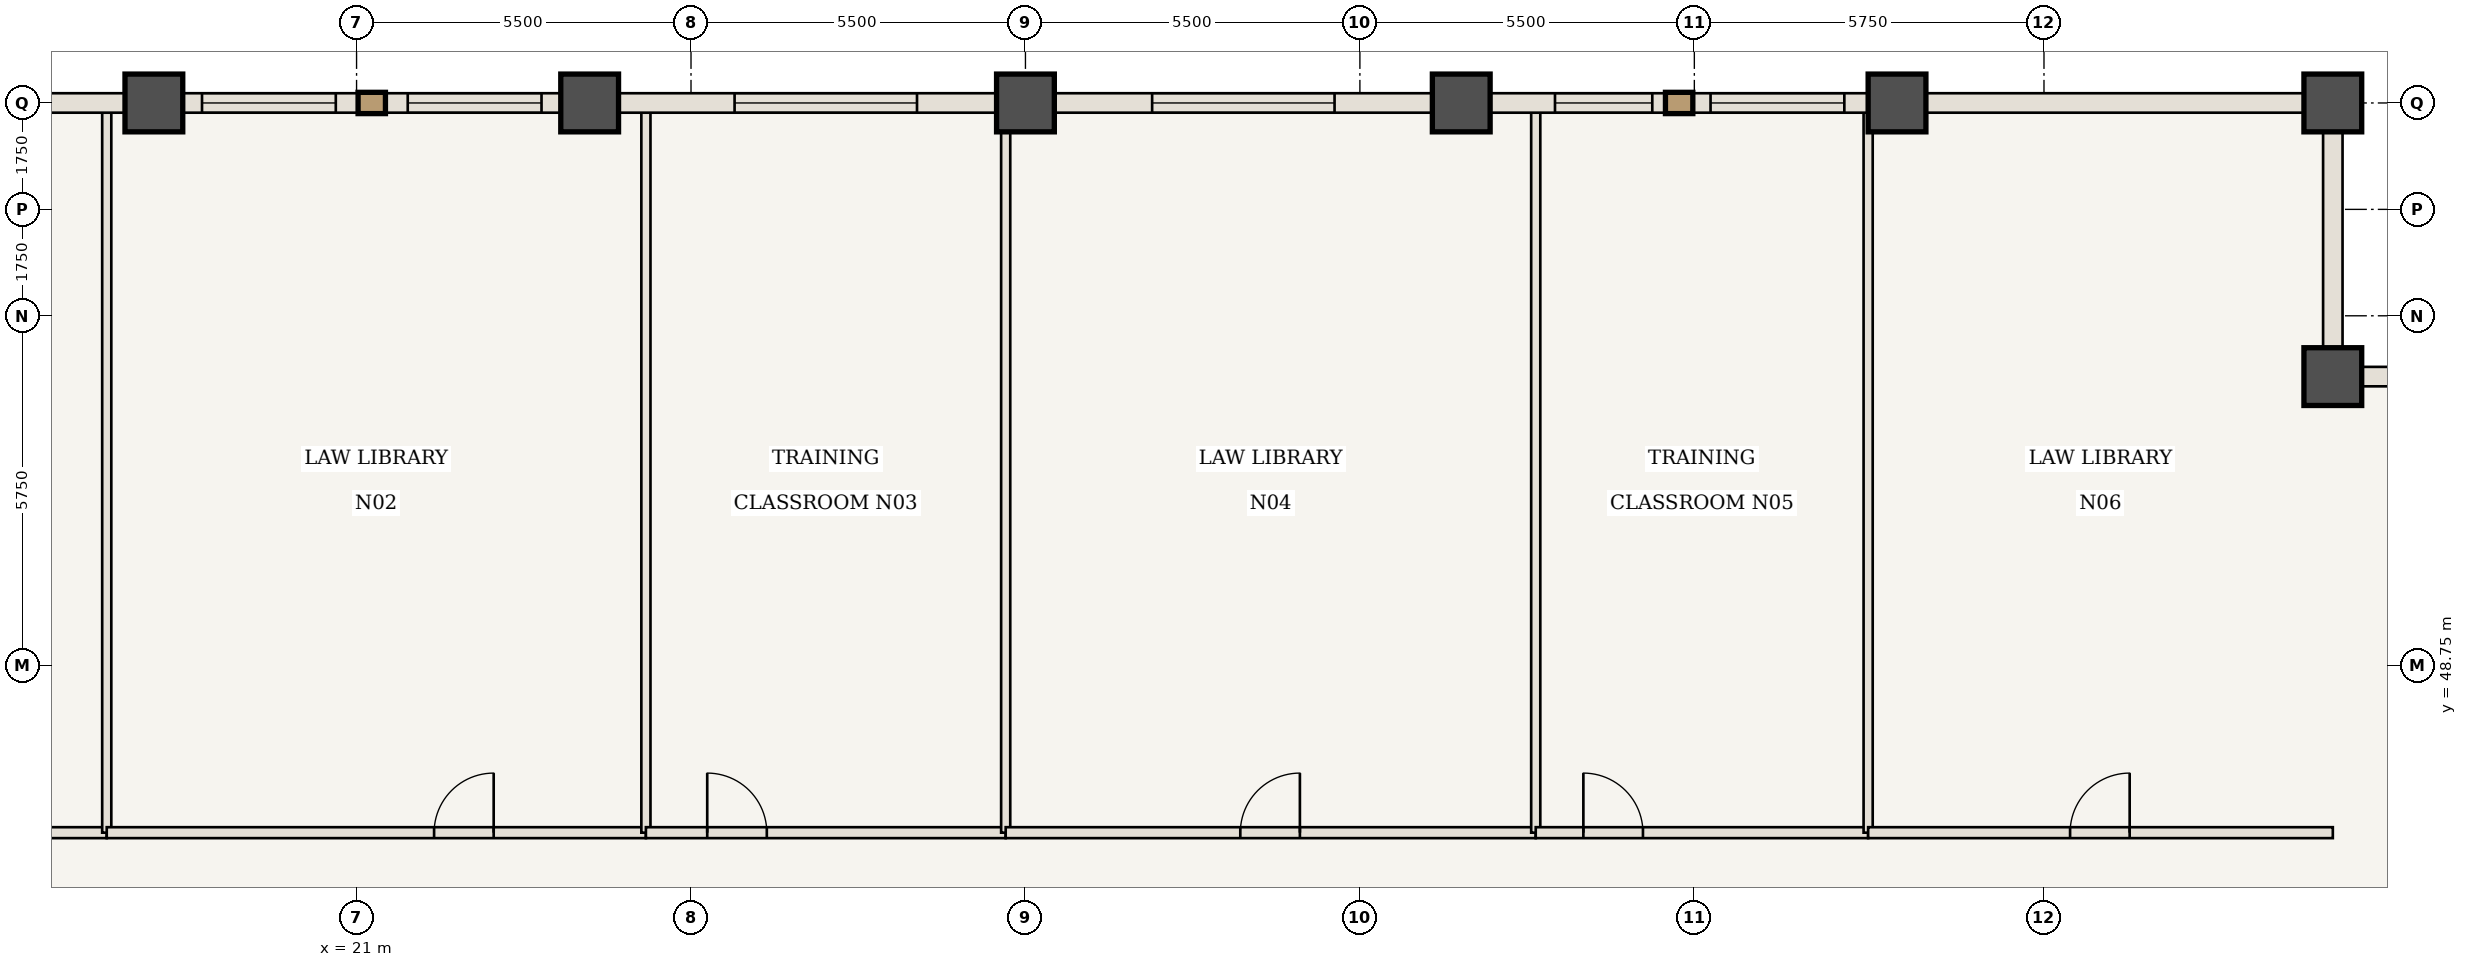
"""IFC4 building model, lengths in metres.
Left out: names, types, materials, properties, quantities, classifications, styles, units other than length and angle.
Written with IfcOpenShell. Run it as: python <this file> out.ifc"""

import sys

from ifc_helpers import new_model, si_unit, direction, frame, frame_2d, origin, origin_2d, place, context, subcontext, project, spatial, rectangle, extrude, element, fill, save


model = new_model("IFC4")
c1 = context("Model", 3, precision=1e-05, world=origin(), true_north=direction((0.0, 1.0)))
c2 = subcontext(c1, "Body", "Model", "MODEL_VIEW")
j1 = project(units=[si_unit("LENGTHUNIT", "METRE"), si_unit("PLANEANGLEUNIT", "RADIAN")], contexts=[c1])
p1 = place(None, origin())
s1 = spatial("IfcSite", under=j1, at=p1, CompositionType="ELEMENT")
p2 = place(p1, origin())
s2 = spatial("IfcBuilding", under=s1, at=p2, CompositionType="ELEMENT")
p3 = place(p2, frame((0.0, 0.0, 122.15)))
s3 = spatial("IfcBuildingStorey", under=s2, at=p3, CompositionType="ELEMENT", Elevation=122.15)
for number, where, z_axis, x_axis in (
    (1, (53.5, 53.5, 0.0), (0.0, 0.0, 1.0), (1.0, 0.0, 0.0)),
    (2, (53.5, 58.0, 0.0), (0.0, 0.0, 1.0), (1.0, 0.0, 0.0)),
    (3, (17.667, 58.0, 0.0), (0.0, 0.0, 1.0), (1.0, 0.0, 0.0)),
    (4, (24.833, 58.0, 0.0), (0.0, 0.0, 1.0), (1.0, 0.0, 0.0)),
    (5, (32.0, 58.0, 0.0), (0.0, 0.0, 1.0), (1.0, 0.0, 0.0)),
    (6, (39.167, 58.0, 0.0), (0.0, 0.0, 1.0), (1.0, 0.0, 0.0)),
    (7, (46.333, 58.0, 0.0), (0.0, 0.0, 1.0), (1.0, 0.0, 0.0)),
):
    element("IfcColumn", number, at=place(p3, frame(where, z_axis=z_axis, x_axis=x_axis)), inside=s3, PredefinedType="COLUMN", context=c2, shape_type="SweptSolid", body=[
        extrude(rectangle(XDim=0.95, YDim=0.95, at=origin_2d()), origin(), (0.0, 0.0, 1.0), 3.85),
    ])
p4 = place(p3, frame((10.5, 46.0, 0.0), z_axis=(0.0, 0.0, 1.0), x_axis=(1.0, 0.0, 0.0)))
e8 = element("IfcWall", 8, at=p4, inside=s3, PredefinedType="STANDARD", context=c2, shape_type="SweptSolid", body=[
    extrude(rectangle(XDim=6.392, YDim=0.18, at=frame_2d((3.196, 0.0))), origin(), (0.0, 0.0, 1.0), 3.685),
])
p5 = place(p4, frame((2.696, 0.0, 0.0)))
e9 = element("IfcOpeningElement", 9, at=p5, cuts=e8, PredefinedType="OPENING", context=c2, shape_type="SweptSolid", body=[
    extrude(rectangle(XDim=0.98, YDim=2.2, at=frame_2d((0.49, 1.1))), frame((0.0, 0.1, 0.0), z_axis=(0.0, -1.0, 0.0), x_axis=(1.0, 0.0, 0.0)), (0.0, 0.0, 1.0), 0.2),
])
p6 = place(p3, frame((16.892, 46.0, 0.0), z_axis=(0.0, 0.0, 1.0), x_axis=(0.0, 1.0, 0.0)))
e10 = element("IfcWall", 10, at=p6, inside=s3, PredefinedType="STANDARD", context=c2, shape_type="SweptSolid", body=[
    extrude(rectangle(XDim=11.94, YDim=0.15, at=frame_2d((5.97, 0.0))), origin(), (0.0, 0.0, 1.0), 3.685),
])
p7 = place(p3, frame((16.892, 46.0, 0.0), z_axis=(0.0, 0.0, 1.0), x_axis=(1.0, 0.0, 0.0)))
e11 = element("IfcWall", 11, at=p7, inside=s3, PredefinedType="STANDARD", context=c2, shape_type="SweptSolid", body=[
    extrude(rectangle(XDim=8.867, YDim=0.18, at=frame_2d((4.433, 0.0))), origin(), (0.0, 0.0, 1.0), 3.685),
])
p8 = place(p7, frame((5.383, 0.0, 0.0)))
e12 = element("IfcOpeningElement", 12, at=p8, cuts=e11, PredefinedType="OPENING", context=c2, shape_type="SweptSolid", body=[
    extrude(rectangle(XDim=0.98, YDim=2.2, at=frame_2d((0.49, 1.1))), frame((0.0, 0.1, 0.0), z_axis=(0.0, -1.0, 0.0), x_axis=(1.0, 0.0, 0.0)), (0.0, 0.0, 1.0), 0.2),
])
p9 = place(p3, frame((25.758, 46.0, 0.0), z_axis=(0.0, 0.0, 1.0), x_axis=(0.0, 1.0, 0.0)))
e13 = element("IfcWall", 13, at=p9, inside=s3, PredefinedType="STANDARD", context=c2, shape_type="SweptSolid", body=[
    extrude(rectangle(XDim=11.94, YDim=0.15, at=frame_2d((5.97, 0.0))), origin(), (0.0, 0.0, 1.0), 3.685),
])
p10 = place(p3, frame((25.758, 46.0, 0.0), z_axis=(0.0, 0.0, 1.0), x_axis=(1.0, 0.0, 0.0)))
e14 = element("IfcWall", 14, at=p10, inside=s3, PredefinedType="STANDARD", context=c2, shape_type="SweptSolid", body=[
    extrude(rectangle(XDim=5.917, YDim=0.18, at=frame_2d((2.958, 0.0))), origin(), (0.0, 0.0, 1.0), 3.685),
])
p11 = place(p10, frame((1.008, 0.0, 0.0)))
e15 = element("IfcOpeningElement", 15, at=p11, cuts=e14, PredefinedType="OPENING", context=c2, shape_type="SweptSolid", body=[
    extrude(rectangle(XDim=0.98, YDim=2.2, at=frame_2d((0.49, 1.1))), frame((0.0, 0.1, 0.0), z_axis=(0.0, -1.0, 0.0), x_axis=(1.0, 0.0, 0.0)), (0.0, 0.0, 1.0), 0.2),
])
p12 = place(p3, frame((31.675, 46.0, 0.0), z_axis=(0.0, 0.0, 1.0), x_axis=(0.0, 1.0, 0.0)))
e16 = element("IfcWall", 16, at=p12, inside=s3, PredefinedType="STANDARD", context=c2, shape_type="SweptSolid", body=[
    extrude(rectangle(XDim=11.94, YDim=0.15, at=frame_2d((5.97, 0.0))), origin(), (0.0, 0.0, 1.0), 3.685),
])
p13 = place(p3, frame((31.675, 46.0, 0.0), z_axis=(0.0, 0.0, 1.0), x_axis=(1.0, 0.0, 0.0)))
e17 = element("IfcWall", 17, at=p13, inside=s3, PredefinedType="STANDARD", context=c2, shape_type="SweptSolid", body=[
    extrude(rectangle(XDim=8.717, YDim=0.18, at=frame_2d((4.358, 0.0))), origin(), (0.0, 0.0, 1.0), 3.685),
])
p14 = place(p13, frame((3.858, 0.0, 0.0)))
e18 = element("IfcOpeningElement", 18, at=p14, cuts=e17, PredefinedType="OPENING", context=c2, shape_type="SweptSolid", body=[
    extrude(rectangle(XDim=0.98, YDim=2.2, at=frame_2d((0.49, 1.1))), frame((0.0, 0.1, 0.0), z_axis=(0.0, -1.0, 0.0), x_axis=(1.0, 0.0, 0.0)), (0.0, 0.0, 1.0), 0.2),
])
p15 = place(p3, frame((40.392, 46.0, 0.0), z_axis=(0.0, 0.0, 1.0), x_axis=(0.0, 1.0, 0.0)))
e19 = element("IfcWall", 19, at=p15, inside=s3, PredefinedType="STANDARD", context=c2, shape_type="SweptSolid", body=[
    extrude(rectangle(XDim=11.94, YDim=0.15, at=frame_2d((5.97, 0.0))), origin(), (0.0, 0.0, 1.0), 3.685),
])
p16 = place(p3, frame((40.392, 46.0, 0.0), z_axis=(0.0, 0.0, 1.0), x_axis=(1.0, 0.0, 0.0)))
e20 = element("IfcWall", 20, at=p16, inside=s3, PredefinedType="STANDARD", context=c2, shape_type="SweptSolid", body=[
    extrude(rectangle(XDim=5.467, YDim=0.18, at=frame_2d((2.733, 0.0))), origin(), (0.0, 0.0, 1.0), 3.685),
])
p17 = place(p16, frame((0.783, 0.0, 0.0)))
e21 = element("IfcOpeningElement", 21, at=p17, cuts=e20, PredefinedType="OPENING", context=c2, shape_type="SweptSolid", body=[
    extrude(rectangle(XDim=0.98, YDim=2.2, at=frame_2d((0.49, 1.1))), frame((0.0, 0.1, 0.0), z_axis=(0.0, -1.0, 0.0), x_axis=(1.0, 0.0, 0.0)), (0.0, 0.0, 1.0), 0.2),
])
p18 = place(p3, frame((45.858, 46.0, 0.0), z_axis=(0.0, 0.0, 1.0), x_axis=(0.0, 1.0, 0.0)))
e22 = element("IfcWall", 22, at=p18, inside=s3, PredefinedType="STANDARD", context=c2, shape_type="SweptSolid", body=[
    extrude(rectangle(XDim=11.94, YDim=0.15, at=frame_2d((5.97, 0.0))), origin(), (0.0, 0.0, 1.0), 3.685),
])
p19 = place(p3, frame((45.858, 46.0, 0.0), z_axis=(0.0, 0.0, 1.0), x_axis=(1.0, 0.0, 0.0)))
e23 = element("IfcWall", 23, at=p19, inside=s3, PredefinedType="STANDARD", context=c2, shape_type="SweptSolid", body=[
    extrude(rectangle(XDim=7.642, YDim=0.18, at=frame_2d((3.821, 0.0))), origin(), (0.0, 0.0, 1.0), 3.685),
])
p20 = place(p19, frame((3.321, 0.0, 0.0)))
e24 = element("IfcOpeningElement", 24, at=p20, cuts=e23, PredefinedType="OPENING", context=c2, shape_type="SweptSolid", body=[
    extrude(rectangle(XDim=0.98, YDim=2.2, at=frame_2d((0.49, 1.1))), frame((0.0, 0.1, 0.0), z_axis=(0.0, -1.0, 0.0), x_axis=(1.0, 0.0, 0.0)), (0.0, 0.0, 1.0), 0.2),
])
p21 = place(p3, frame((10.5, 58.0, 0.0), z_axis=(0.0, 0.0, 1.0), x_axis=(1.0, 0.0, 0.0)))
e25 = element("IfcWall", 25, at=p21, inside=s3, PredefinedType="USERDEFINED", context=c2, shape_type="SweptSolid", body=[
    extrude(rectangle(XDim=7.167, YDim=0.32, at=frame_2d((3.583, 0.0))), origin(), (0.0, 0.0, 1.0), 2.885),
])
p22 = place(p3, frame((17.667, 58.0, 0.0), z_axis=(0.0, 0.0, 1.0), x_axis=(1.0, 0.0, 0.0)))
e26 = element("IfcWall", 26, at=p22, inside=s3, PredefinedType="USERDEFINED", context=c2, shape_type="SweptSolid", body=[
    extrude(rectangle(XDim=7.167, YDim=0.32, at=frame_2d((3.583, 0.0))), origin(), (0.0, 0.0, 1.0), 2.885),
])
p23 = place(p22, frame((0.792, 0.0, 0.85)))
e27 = element("IfcOpeningElement", 27, at=p23, cuts=e26, PredefinedType="OPENING", context=c2, shape_type="SweptSolid", body=[
    extrude(rectangle(XDim=2.2, YDim=1.835, at=frame_2d((1.1, 0.917))), frame((0.0, 0.17, 0.0), z_axis=(0.0, -1.0, 0.0), x_axis=(1.0, 0.0, 0.0)), (0.0, 0.0, 1.0), 0.34),
])
p24 = place(p22, frame((4.175, 0.0, 0.85)))
e28 = element("IfcOpeningElement", 28, at=p24, cuts=e26, PredefinedType="OPENING", context=c2, shape_type="SweptSolid", body=[
    extrude(rectangle(XDim=2.2, YDim=1.835, at=frame_2d((1.1, 0.917))), frame((0.0, 0.17, 0.0), z_axis=(0.0, -1.0, 0.0), x_axis=(1.0, 0.0, 0.0)), (0.0, 0.0, 1.0), 0.34),
])
p25 = place(p3, frame((24.833, 58.0, 0.0), z_axis=(0.0, 0.0, 1.0), x_axis=(1.0, 0.0, 0.0)))
e29 = element("IfcWall", 29, at=p25, inside=s3, PredefinedType="USERDEFINED", context=c2, shape_type="SweptSolid", body=[
    extrude(rectangle(XDim=7.167, YDim=0.32, at=frame_2d((3.583, 0.0))), origin(), (0.0, 0.0, 1.0), 2.885),
])
p26 = place(p25, frame((2.383, 0.0, 0.85)))
e30 = element("IfcOpeningElement", 30, at=p26, cuts=e29, PredefinedType="OPENING", context=c2, shape_type="SweptSolid", body=[
    extrude(rectangle(XDim=3.0, YDim=1.835, at=frame_2d((1.5, 0.917))), frame((0.0, 0.17, 0.0), z_axis=(0.0, -1.0, 0.0), x_axis=(1.0, 0.0, 0.0)), (0.0, 0.0, 1.0), 0.34),
])
p27 = place(p3, frame((32.0, 58.0, 0.0), z_axis=(0.0, 0.0, 1.0), x_axis=(1.0, 0.0, 0.0)))
e31 = element("IfcWall", 31, at=p27, inside=s3, PredefinedType="USERDEFINED", context=c2, shape_type="SweptSolid", body=[
    extrude(rectangle(XDim=7.167, YDim=0.32, at=frame_2d((3.583, 0.0))), origin(), (0.0, 0.0, 1.0), 2.885),
])
p28 = place(p27, frame((2.083, 0.0, 0.85)))
e32 = element("IfcOpeningElement", 32, at=p28, cuts=e31, PredefinedType="OPENING", context=c2, shape_type="SweptSolid", body=[
    extrude(rectangle(XDim=3.0, YDim=1.835, at=frame_2d((1.5, 0.917))), frame((0.0, 0.17, 0.0), z_axis=(0.0, -1.0, 0.0), x_axis=(1.0, 0.0, 0.0)), (0.0, 0.0, 1.0), 0.34),
])
p29 = place(p3, frame((39.167, 58.0, 0.0), z_axis=(0.0, 0.0, 1.0), x_axis=(1.0, 0.0, 0.0)))
e33 = element("IfcWall", 33, at=p29, inside=s3, PredefinedType="USERDEFINED", context=c2, shape_type="SweptSolid", body=[
    extrude(rectangle(XDim=7.167, YDim=0.32, at=frame_2d((3.583, 0.0))), origin(), (0.0, 0.0, 1.0), 2.885),
])
p30 = place(p29, frame((1.542, 0.0, 0.85)))
e34 = element("IfcOpeningElement", 34, at=p30, cuts=e33, PredefinedType="OPENING", context=c2, shape_type="SweptSolid", body=[
    extrude(rectangle(XDim=1.6, YDim=1.835, at=frame_2d((0.8, 0.917))), frame((0.0, 0.17, 0.0), z_axis=(0.0, -1.0, 0.0), x_axis=(1.0, 0.0, 0.0)), (0.0, 0.0, 1.0), 0.34),
])
p31 = place(p29, frame((4.1, 0.0, 0.85)))
e35 = element("IfcOpeningElement", 35, at=p31, cuts=e33, PredefinedType="OPENING", context=c2, shape_type="SweptSolid", body=[
    extrude(rectangle(XDim=2.2, YDim=1.835, at=frame_2d((1.1, 0.917))), frame((0.0, 0.17, 0.0), z_axis=(0.0, -1.0, 0.0), x_axis=(1.0, 0.0, 0.0)), (0.0, 0.0, 1.0), 0.34),
])
p32 = place(p3, frame((46.333, 58.0, 0.0), z_axis=(0.0, 0.0, 1.0), x_axis=(1.0, 0.0, 0.0)))
e36 = element("IfcWall", 36, at=p32, inside=s3, PredefinedType="USERDEFINED", context=c2, shape_type="SweptSolid", body=[
    extrude(rectangle(XDim=7.167, YDim=0.32, at=frame_2d((3.583, 0.0))), origin(), (0.0, 0.0, 1.0), 2.885),
])
for number, where, z_axis, x_axis in (
    (37, (53.5, 53.5, 0.0), (0.0, 0.0, 1.0), (1.0, 0.0, 0.0)),
    (38, (53.5, 58.0, 0.0), (0.0, 0.0, 1.0), (0.0, -1.0, 0.0)),
):
    element("IfcWall", number, at=place(p3, frame(where, z_axis=z_axis, x_axis=x_axis)), inside=s3, PredefinedType="USERDEFINED", context=c2, shape_type="SweptSolid", body=[
        extrude(rectangle(XDim=4.5, YDim=0.32, at=frame_2d((2.25, 0.0))), origin(), (0.0, 0.0, 1.0), 2.885),
    ])
p33 = place(p8, origin())
e39 = element("IfcDoor", 39, at=p33, inside=s3, OperationType="SINGLE_SWING_RIGHT", PredefinedType="DOOR", context=c2, shape_type="SweptSolid", body=[
    extrude(rectangle(XDim=0.98, YDim=2.2, at=frame_2d((0.49, 1.1))), frame((0.0, 0.025, 0.0), z_axis=(0.0, -1.0, 0.0), x_axis=(1.0, 0.0, 0.0)), (0.0, 0.0, 1.0), 0.05),
])
fill(e12, e39)
p34 = place(p11, origin())
e40 = element("IfcDoor", 40, at=p34, inside=s3, OperationType="SINGLE_SWING_LEFT", PredefinedType="DOOR", context=c2, shape_type="SweptSolid", body=[
    extrude(rectangle(XDim=0.98, YDim=2.2, at=frame_2d((0.49, 1.1))), frame((0.0, 0.025, 0.0), z_axis=(0.0, -1.0, 0.0), x_axis=(1.0, 0.0, 0.0)), (0.0, 0.0, 1.0), 0.05),
])
fill(e15, e40)
p35 = place(p14, origin())
e41 = element("IfcDoor", 41, at=p35, inside=s3, OperationType="SINGLE_SWING_RIGHT", PredefinedType="DOOR", context=c2, shape_type="SweptSolid", body=[
    extrude(rectangle(XDim=0.98, YDim=2.2, at=frame_2d((0.49, 1.1))), frame((0.0, 0.025, 0.0), z_axis=(0.0, -1.0, 0.0), x_axis=(1.0, 0.0, 0.0)), (0.0, 0.0, 1.0), 0.05),
])
fill(e18, e41)
p36 = place(p17, origin())
e42 = element("IfcDoor", 42, at=p36, inside=s3, OperationType="SINGLE_SWING_LEFT", PredefinedType="DOOR", context=c2, shape_type="SweptSolid", body=[
    extrude(rectangle(XDim=0.98, YDim=2.2, at=frame_2d((0.49, 1.1))), frame((0.0, 0.025, 0.0), z_axis=(0.0, -1.0, 0.0), x_axis=(1.0, 0.0, 0.0)), (0.0, 0.0, 1.0), 0.05),
])
fill(e21, e42)
p37 = place(p20, origin())
e43 = element("IfcDoor", 43, at=p37, inside=s3, OperationType="SINGLE_SWING_RIGHT", PredefinedType="DOOR", context=c2, shape_type="SweptSolid", body=[
    extrude(rectangle(XDim=0.98, YDim=2.2, at=frame_2d((0.49, 1.1))), frame((0.0, 0.025, 0.0), z_axis=(0.0, -1.0, 0.0), x_axis=(1.0, 0.0, 0.0)), (0.0, 0.0, 1.0), 0.05),
])
fill(e24, e43)
p38 = place(p23, origin())
e44 = element("IfcWindow", 44, at=p38, inside=s3, PartitioningType="SINGLE_PANEL", PredefinedType="WINDOW", context=c2, shape_type="SweptSolid", body=[
    extrude(rectangle(XDim=2.2, YDim=1.835, at=frame_2d((1.1, 0.917))), frame((0.0, 0.03, 0.0), z_axis=(0.0, -1.0, 0.0), x_axis=(1.0, 0.0, 0.0)), (0.0, 0.0, 1.0), 0.06),
])
fill(e27, e44)
p39 = place(p24, origin())
e45 = element("IfcWindow", 45, at=p39, inside=s3, PartitioningType="SINGLE_PANEL", PredefinedType="WINDOW", context=c2, shape_type="SweptSolid", body=[
    extrude(rectangle(XDim=2.2, YDim=1.835, at=frame_2d((1.1, 0.917))), frame((0.0, 0.03, 0.0), z_axis=(0.0, -1.0, 0.0), x_axis=(1.0, 0.0, 0.0)), (0.0, 0.0, 1.0), 0.06),
])
fill(e28, e45)
p40 = place(p26, origin())
e46 = element("IfcWindow", 46, at=p40, inside=s3, PartitioningType="SINGLE_PANEL", PredefinedType="WINDOW", context=c2, shape_type="SweptSolid", body=[
    extrude(rectangle(XDim=3.0, YDim=1.835, at=frame_2d((1.5, 0.917))), frame((0.0, 0.03, 0.0), z_axis=(0.0, -1.0, 0.0), x_axis=(1.0, 0.0, 0.0)), (0.0, 0.0, 1.0), 0.06),
])
fill(e30, e46)
p41 = place(p28, origin())
e47 = element("IfcWindow", 47, at=p41, inside=s3, PartitioningType="SINGLE_PANEL", PredefinedType="WINDOW", context=c2, shape_type="SweptSolid", body=[
    extrude(rectangle(XDim=3.0, YDim=1.835, at=frame_2d((1.5, 0.917))), frame((0.0, 0.03, 0.0), z_axis=(0.0, -1.0, 0.0), x_axis=(1.0, 0.0, 0.0)), (0.0, 0.0, 1.0), 0.06),
])
fill(e32, e47)
p42 = place(p30, origin())
e48 = element("IfcWindow", 48, at=p42, inside=s3, PartitioningType="SINGLE_PANEL", PredefinedType="WINDOW", context=c2, shape_type="SweptSolid", body=[
    extrude(rectangle(XDim=1.6, YDim=1.835, at=frame_2d((0.8, 0.917))), frame((0.0, 0.03, 0.0), z_axis=(0.0, -1.0, 0.0), x_axis=(1.0, 0.0, 0.0)), (0.0, 0.0, 1.0), 0.06),
])
fill(e34, e48)
p43 = place(p31, origin())
e49 = element("IfcWindow", 49, at=p43, inside=s3, PartitioningType="SINGLE_PANEL", PredefinedType="WINDOW", context=c2, shape_type="SweptSolid", body=[
    extrude(rectangle(XDim=2.2, YDim=1.835, at=frame_2d((1.1, 0.917))), frame((0.0, 0.03, 0.0), z_axis=(0.0, -1.0, 0.0), x_axis=(1.0, 0.0, 0.0)), (0.0, 0.0, 1.0), 0.06),
])
fill(e35, e49)
save(model, sys.argv[1])
